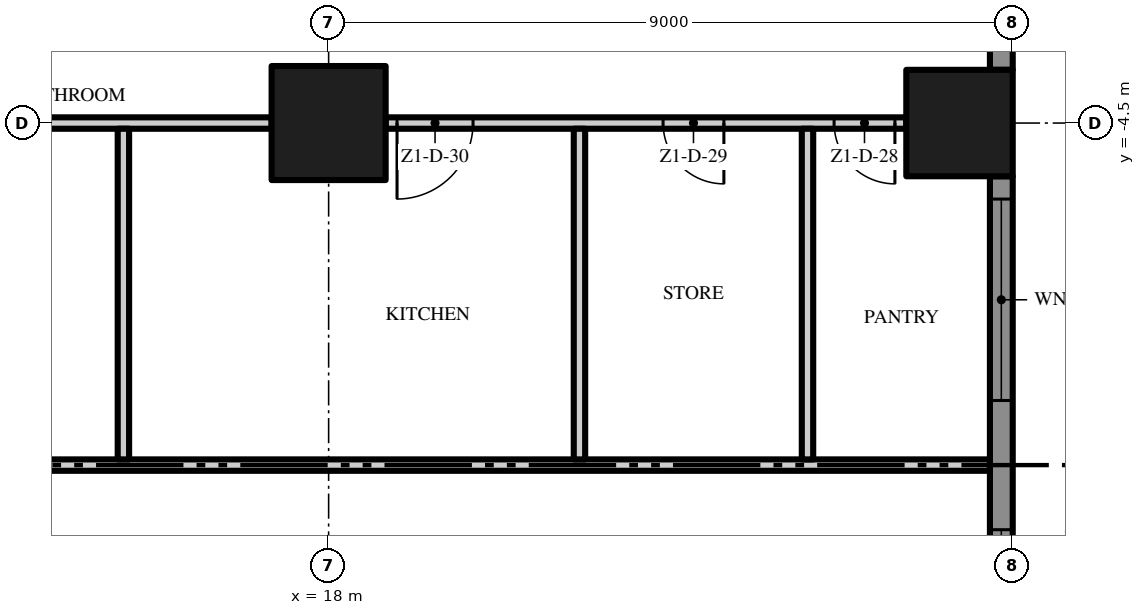
"""IFC4 building model, lengths in metres.
Left out: names, types, materials, properties, quantities, classifications, styles, units other than length and angle.
Written with IfcOpenShell. Run it as: python <this file> out.ifc"""

import sys

from ifc_helpers import new_model, si_unit, direction, frame, frame_2d, origin, origin_2d, place, context, subcontext, project, spatial, polyline, rectangle, outline, extrude, element, fill, save


model = new_model("IFC4")
c1 = context("Model", 3, precision=1e-05, world=origin(), true_north=direction((0.0, 1.0)))
c2 = subcontext(c1, "Body", "Model", "MODEL_VIEW")
j1 = project(units=[si_unit("LENGTHUNIT", "METRE"), si_unit("PLANEANGLEUNIT", "RADIAN")], contexts=[c1])
p1 = place(None, origin())
s1 = spatial("IfcSite", under=j1, at=p1, CompositionType="ELEMENT")
p2 = place(p1, origin())
s2 = spatial("IfcBuilding", under=s1, at=p2, CompositionType="ELEMENT")
p3 = place(p2, frame((0.0, 0.0, 53.0)))
s3 = spatial("IfcBuildingStorey", under=s2, at=p3, CompositionType="ELEMENT", Elevation=53.0)
p4 = place(p3, frame((18.0, -4.5, 0.0), z_axis=(0.0, 0.0, 1.0), x_axis=(1.0, 0.0, 0.0)))
e1 = element("IfcColumn", 1, at=p4, inside=s3, PredefinedType="COLUMN", context=c2, shape_type="SweptSolid", body=[
    extrude(rectangle(XDim=1.5, YDim=1.5, at=origin_2d()), origin(), (0.0, 0.0, 1.0), 3.5),
])
p5 = place(p3, frame((26.3, -4.5, 0.0), z_axis=(0.0, 0.0, 1.0), x_axis=(1.0, 0.0, 0.0)))
e2 = element("IfcColumn", 2, at=p5, inside=s3, PredefinedType="COLUMN", context=c2, shape_type="SweptSolid", body=[
    extrude(rectangle(XDim=1.4, YDim=1.4, at=origin_2d()), origin(), (0.0, 0.0, 1.0), 3.5),
])
p6 = place(p3, frame((26.85, -5.2, 0.0), z_axis=(0.0, 0.0, 1.0), x_axis=(0.0, -1.0, 0.0)))
e3 = element("IfcWall", 3, at=p6, inside=s3, PredefinedType="SOLIDWALL", context=c2, shape_type="SweptSolid", body=[
    extrude(rectangle(XDim=7.6, YDim=0.3, at=frame_2d((3.8, 0.0))), origin(), (0.0, 0.0, 1.0), 3.5),
])
p7 = place(p6, frame((4.65, 0.0, 0.45)))
e4 = element("IfcOpeningElement", 4, at=p7, cuts=e3, PredefinedType="OPENING", context=c2, shape_type="SweptSolid", body=[
    extrude(rectangle(XDim=2.65, YDim=2.65, at=frame_2d((1.325, 1.325))), frame((0.0, 0.16, 0.0), z_axis=(0.0, -1.0, 0.0), x_axis=(1.0, 0.0, 0.0)), (0.0, 0.0, 1.0), 0.32),
])
p8 = place(p6, frame((0.3, 0.0, 0.45)))
e5 = element("IfcOpeningElement", 5, at=p8, cuts=e3, PredefinedType="OPENING", context=c2, shape_type="SweptSolid", body=[
    extrude(rectangle(XDim=2.65, YDim=2.65, at=frame_2d((1.325, 1.325))), frame((0.0, 0.16, 0.0), z_axis=(0.0, -1.0, 0.0), x_axis=(1.0, 0.0, 0.0)), (0.0, 0.0, 1.0), 0.32),
])
p9 = place(p3, frame((26.85, 3.8, 0.0), z_axis=(0.0, 0.0, 1.0), x_axis=(0.0, -1.0, 0.0)))
e6 = element("IfcWall", 6, at=p9, inside=s3, PredefinedType="SOLIDWALL", context=c2, shape_type="SweptSolid", body=[
    extrude(rectangle(XDim=7.6, YDim=0.3, at=frame_2d((3.8, 0.0))), origin(), (0.0, 0.0, 1.0), 3.5),
])
p10 = place(p9, frame((4.65, 0.0, 0.0)))
e7 = element("IfcOpeningElement", 7, at=p10, cuts=e6, PredefinedType="OPENING", context=c2, shape_type="SweptSolid", body=[
    extrude(rectangle(XDim=2.65, YDim=2.4, at=frame_2d((1.325, 1.2))), frame((0.0, 0.16, 0.0), z_axis=(0.0, -1.0, 0.0), x_axis=(1.0, 0.0, 0.0)), (0.0, 0.0, 1.0), 0.32),
])
p11 = place(p9, frame((0.3, 0.0, 0.45)))
e8 = element("IfcOpeningElement", 8, at=p11, cuts=e6, PredefinedType="OPENING", context=c2, shape_type="SweptSolid", body=[
    extrude(rectangle(XDim=2.65, YDim=2.65, at=frame_2d((1.325, 1.325))), frame((0.0, 0.16, 0.0), z_axis=(0.0, -1.0, 0.0), x_axis=(1.0, 0.0, 0.0)), (0.0, 0.0, 1.0), 0.32),
])
p12 = place(p3, origin())
e9 = element("IfcWall", 9, at=p12, inside=s3, PredefinedType="USERDEFINED", context=c2, shape_type="SweptSolid", body=[
    extrude(outline(polyline([(30.0, -18.0), (29.771, -16.5), (29.171, -15.0), (28.429, -13.5), (27.829, -12.0), (27.6, -10.5), (27.829, -9.0), (28.429, -7.5), (29.171, -6.0), (29.771, -4.5), (30.0, -3.0), (29.771, -1.5), (29.171, 0.0), (28.429, 1.5), (27.829, 3.0), (27.6, 4.5), (27.829, 6.0), (28.429, 7.5), (29.171, 9.0), (29.771, 10.5), (30.0, 12.0), (29.771, 13.5), (29.171, 15.0), (28.429, 16.5), (27.829, 18.0), (27.597, 17.907), (28.201, 16.398), (28.942, 14.898), (29.528, 13.434), (29.747, 12.0), (29.528, 10.566), (28.942, 9.102), (28.201, 7.602), (27.586, 6.066), (27.347, 4.5), (27.586, 2.934), (28.201, 1.398), (28.942, -0.102), (29.528, -1.566), (29.747, -3.0), (29.528, -4.434), (28.942, -5.898), (28.201, -7.398), (27.586, -8.934), (27.347, -10.5), (27.586, -12.066), (28.201, -13.602), (28.942, -15.102), (29.528, -16.566), (29.753, -18.038), (30.0, -18.0)])), origin(), (0.0, 0.0, 1.0), 0.9),
])
p13 = place(p3, frame((13.125, -9.0, 0.0), z_axis=(0.0, 0.0, 1.0), x_axis=(1.0, 0.0, 0.0)))
e10 = element("IfcWall", 10, at=p13, inside=s3, PredefinedType="PARTITIONING", context=c2, shape_type="SweptSolid", body=[
    extrude(rectangle(XDim=13.575, YDim=0.15, at=frame_2d((6.787, 0.0))), origin(), (0.0, 0.0, 1.0), 3.5),
])
p14 = place(p3, frame((13.125, -4.5, 0.0), z_axis=(0.0, 0.0, 1.0), x_axis=(1.0, 0.0, 0.0)))
e11 = element("IfcWall", 11, at=p14, inside=s3, PredefinedType="PARTITIONING", context=c2, shape_type="SweptSolid", body=[
    extrude(rectangle(XDim=4.125, YDim=0.15, at=frame_2d((2.062, 0.0))), origin(), (0.0, 0.0, 1.0), 3.5),
])
p15 = place(p3, frame((25.6, -4.5, 0.0), z_axis=(0.0, 0.0, 1.0), x_axis=(-1.0, 0.0, 0.0)))
e12 = element("IfcWall", 12, at=p15, inside=s3, PredefinedType="PARTITIONING", context=c2, shape_type="SweptSolid", body=[
    extrude(rectangle(XDim=6.85, YDim=0.15, at=frame_2d((3.425, 0.0))), origin(), (0.0, 0.0, 1.0), 3.5),
])
p16 = place(p15, frame((0.15, 0.0, 0.0)))
e13 = element("IfcOpeningElement", 13, at=p16, cuts=e12, PredefinedType="OPENING", context=c2, shape_type="SweptSolid", body=[
    extrude(rectangle(XDim=0.8, YDim=2.0, at=frame_2d((0.4, 1.0))), frame((0.0, 0.085, 0.0), z_axis=(0.0, -1.0, 0.0), x_axis=(1.0, 0.0, 0.0)), (0.0, 0.0, 1.0), 0.17),
])
p17 = place(p15, frame((2.4, 0.0, 0.0)))
e14 = element("IfcOpeningElement", 14, at=p17, cuts=e12, PredefinedType="OPENING", context=c2, shape_type="SweptSolid", body=[
    extrude(rectangle(XDim=0.8, YDim=2.0, at=frame_2d((0.4, 1.0))), frame((0.0, 0.085, 0.0), z_axis=(0.0, -1.0, 0.0), x_axis=(1.0, 0.0, 0.0)), (0.0, 0.0, 1.0), 0.17),
])
p18 = place(p15, frame((5.7, 0.0, 0.0)))
e15 = element("IfcOpeningElement", 15, at=p18, cuts=e12, PredefinedType="OPENING", context=c2, shape_type="SweptSolid", body=[
    extrude(rectangle(XDim=1.0, YDim=2.4, at=frame_2d((0.5, 1.2))), frame((0.0, 0.085, 0.0), z_axis=(0.0, -1.0, 0.0), x_axis=(1.0, 0.0, 0.0)), (0.0, 0.0, 1.0), 0.17),
])
for number, where, z_axis, x_axis in (
    (16, (15.3, -8.925, 0.0), (0.0, 0.0, 1.0), (0.0, 1.0, 0.0)),
    (17, (21.3, -8.925, 0.0), (0.0, 0.0, 1.0), (0.0, 1.0, 0.0)),
    (18, (24.3, -8.925, 0.0), (0.0, 0.0, 1.0), (0.0, 1.0, 0.0)),
):
    element("IfcWall", number, at=place(p3, frame(where, z_axis=z_axis, x_axis=x_axis)), inside=s3, PredefinedType="PARTITIONING", context=c2, shape_type="SweptSolid", body=[
        extrude(rectangle(XDim=4.35, YDim=0.15, at=frame_2d((2.175, 0.0))), origin(), (0.0, 0.0, 1.0), 3.5),
    ])
p19 = place(p7, origin())
e19 = element("IfcWindow", 19, at=p19, inside=s3, PartitioningType="SINGLE_PANEL", PredefinedType="WINDOW", context=c2, shape_type="SweptSolid", body=[
    extrude(rectangle(XDim=2.65, YDim=2.65, at=frame_2d((1.325, 1.325))), frame((0.0, 0.03, 0.0), z_axis=(0.0, -1.0, 0.0), x_axis=(1.0, 0.0, 0.0)), (0.0, 0.0, 1.0), 0.06),
])
fill(e4, e19)
p20 = place(p8, origin())
e20 = element("IfcWindow", 20, at=p20, inside=s3, PartitioningType="SINGLE_PANEL", PredefinedType="WINDOW", context=c2, shape_type="SweptSolid", body=[
    extrude(rectangle(XDim=2.65, YDim=2.65, at=frame_2d((1.325, 1.325))), frame((0.0, 0.03, 0.0), z_axis=(0.0, -1.0, 0.0), x_axis=(1.0, 0.0, 0.0)), (0.0, 0.0, 1.0), 0.06),
])
fill(e5, e20)
p21 = place(p16, origin())
e21 = element("IfcDoor", 21, at=p21, inside=s3, OperationType="SINGLE_SWING_LEFT", PredefinedType="DOOR", context=c2, shape_type="SweptSolid", body=[
    extrude(rectangle(XDim=0.8, YDim=2.0, at=frame_2d((0.4, 1.0))), frame((0.0, 0.025, 0.0), z_axis=(0.0, -1.0, 0.0), x_axis=(1.0, 0.0, 0.0)), (0.0, 0.0, 1.0), 0.05),
])
fill(e13, e21)
p22 = place(p17, origin())
e22 = element("IfcDoor", 22, at=p22, inside=s3, OperationType="SINGLE_SWING_LEFT", PredefinedType="DOOR", context=c2, shape_type="SweptSolid", body=[
    extrude(rectangle(XDim=0.8, YDim=2.0, at=frame_2d((0.4, 1.0))), frame((0.0, 0.025, 0.0), z_axis=(0.0, -1.0, 0.0), x_axis=(1.0, 0.0, 0.0)), (0.0, 0.0, 1.0), 0.05),
])
fill(e14, e22)
p23 = place(p18, origin())
e23 = element("IfcDoor", 23, at=p23, inside=s3, OperationType="SINGLE_SWING_RIGHT", PredefinedType="DOOR", context=c2, shape_type="SweptSolid", body=[
    extrude(rectangle(XDim=1.0, YDim=2.4, at=frame_2d((0.5, 1.2))), frame((0.0, 0.025, 0.0), z_axis=(0.0, -1.0, 0.0), x_axis=(1.0, 0.0, 0.0)), (0.0, 0.0, 1.0), 0.05),
])
fill(e15, e23)
save(model, sys.argv[1])
